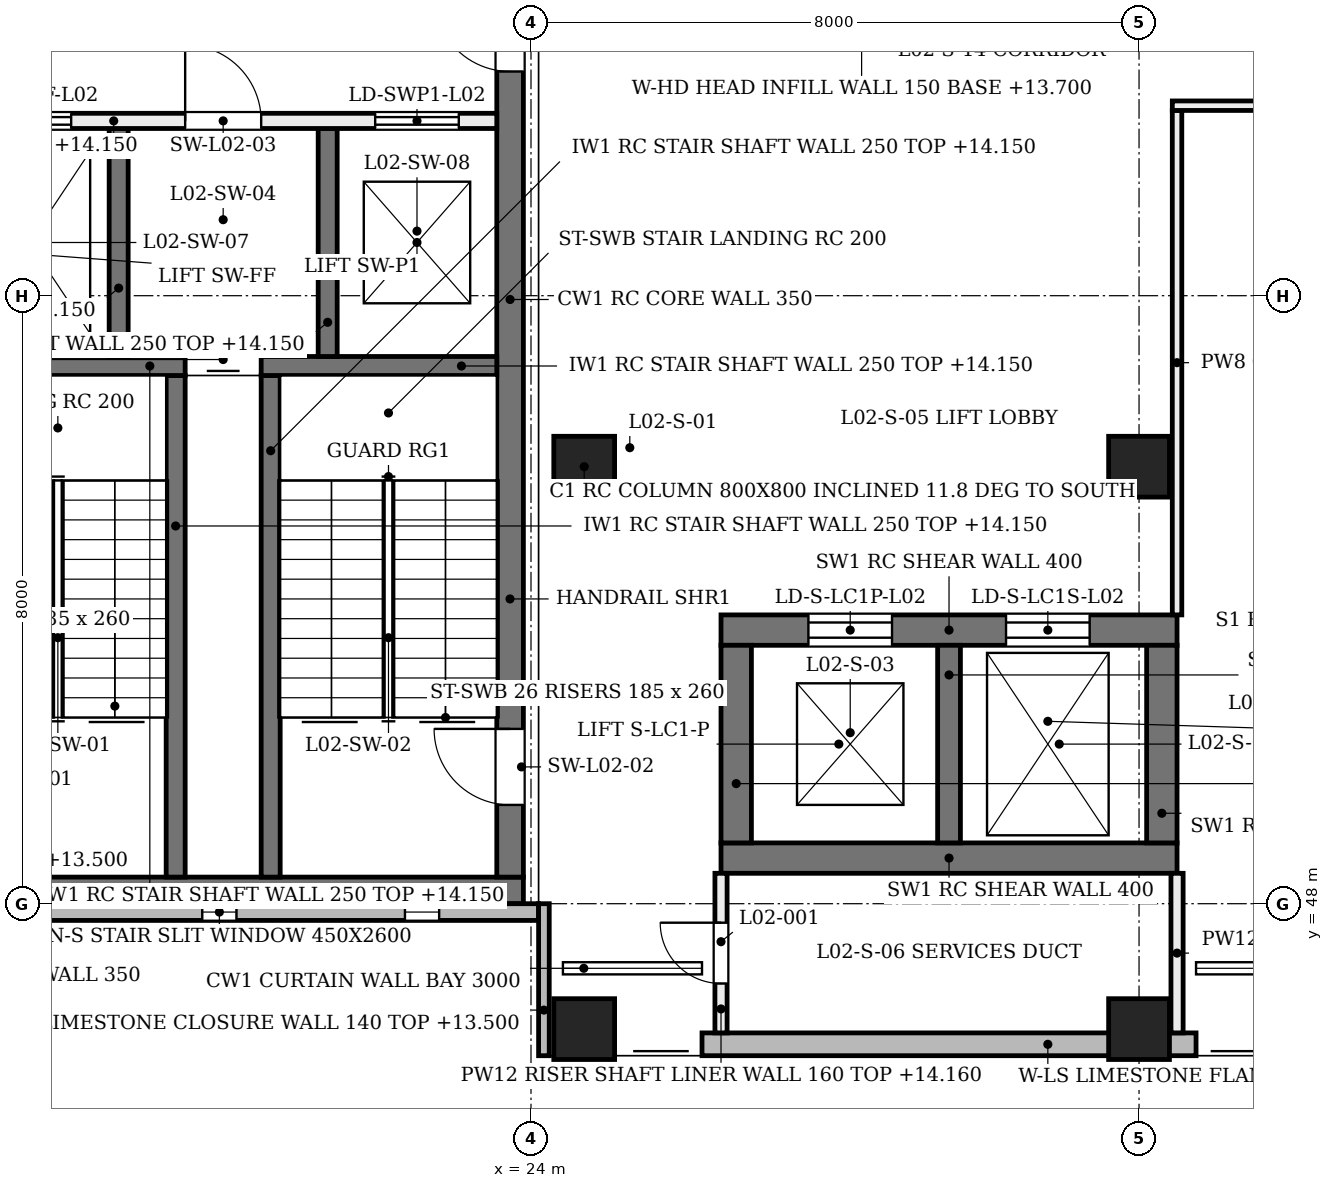
"""IFC4 building model, lengths in metres.
Left out: names, types, materials, properties, quantities, classifications, styles, units other than length and angle.
Written with IfcOpenShell. Run it as: python <this file> out.ifc"""

import sys

from ifc_helpers import new_model, si_unit, direction, frame, frame_2d, origin, origin_2d, place, context, subcontext, project, spatial, rectangle, extrude, element, fill, save


model = new_model("IFC4")
c1 = context("Model", 3, precision=1e-05, world=origin(), true_north=direction((0.0, 1.0)))
c2 = subcontext(c1, "Body", "Model", "MODEL_VIEW")
j1 = project(units=[si_unit("LENGTHUNIT", "METRE"), si_unit("PLANEANGLEUNIT", "RADIAN")], contexts=[c1])
p1 = place(None, origin())
s1 = spatial("IfcSite", under=j1, at=p1, CompositionType="ELEMENT")
p2 = place(p1, origin())
s2 = spatial("IfcBuilding", under=s1, at=p2, CompositionType="ELEMENT")
p3 = place(p2, frame((0.0, 0.0, 9.6)))
s3 = spatial("IfcBuildingStorey", under=s2, at=p3, CompositionType="ELEMENT", Elevation=9.6)
p4 = place(p3, frame((26.5, 48.6, 0.0), z_axis=(0.0, 0.0, 1.0), x_axis=(1.0, 0.0, 0.0)))
e1 = element("IfcWall", 1, at=p4, inside=s3, PredefinedType="SHEAR", context=c2, shape_type="SweptSolid", body=[
    extrude(rectangle(XDim=6.0, YDim=0.4, at=frame_2d((3.0, 0.0))), origin(), (0.0, 0.0, 1.0), 4.58),
])
p5 = place(p3, frame((26.5, 51.6, 0.0), z_axis=(0.0, 0.0, 1.0), x_axis=(1.0, 0.0, 0.0)))
e2 = element("IfcWall", 2, at=p5, inside=s3, PredefinedType="SHEAR", context=c2, shape_type="SweptSolid", body=[
    extrude(rectangle(XDim=6.0, YDim=0.4, at=frame_2d((3.0, 0.0))), origin(), (0.0, 0.0, 1.0), 4.58),
])
p6 = place(p5, frame((1.15, 0.0, 0.0)))
e3 = element("IfcOpeningElement", 3, at=p6, cuts=e2, PredefinedType="OPENING", context=c2, shape_type="SweptSolid", body=[
    extrude(rectangle(XDim=1.1, YDim=2.1, at=frame_2d((0.55, 1.05))), frame((0.0, 0.21, 0.0), z_axis=(0.0, -1.0, 0.0), x_axis=(1.0, 0.0, 0.0)), (0.0, 0.0, 1.0), 0.42),
])
p7 = place(p5, frame((3.75, 0.0, 0.0)))
e4 = element("IfcOpeningElement", 4, at=p7, cuts=e2, PredefinedType="OPENING", context=c2, shape_type="SweptSolid", body=[
    extrude(rectangle(XDim=1.1, YDim=2.1, at=frame_2d((0.55, 1.05))), frame((0.0, 0.21, 0.0), z_axis=(0.0, -1.0, 0.0), x_axis=(1.0, 0.0, 0.0)), (0.0, 0.0, 1.0), 0.42),
])
for number, where, z_axis, x_axis in (
    (5, (26.7, 48.8, 0.0), (0.0, 0.0, 1.0), (0.0, 1.0, 0.0)),
    (6, (32.3, 48.8, 0.0), (0.0, 0.0, 1.0), (0.0, 1.0, 0.0)),
):
    element("IfcWall", number, at=place(p3, frame(where, z_axis=z_axis, x_axis=x_axis)), inside=s3, PredefinedType="SHEAR", context=c2, shape_type="SweptSolid", body=[
        extrude(rectangle(XDim=2.6, YDim=0.4, at=frame_2d((1.3, 0.0))), origin(), (0.0, 0.0, 1.0), 4.58),
    ])
p8 = place(p3, frame((29.5, 48.8, 0.0), z_axis=(0.0, 0.0, 1.0), x_axis=(0.0, 1.0, 0.0)))
e7 = element("IfcWall", 7, at=p8, inside=s3, PredefinedType="SHEAR", context=c2, shape_type="SweptSolid", body=[
    extrude(rectangle(XDim=2.6, YDim=0.3, at=frame_2d((1.3, 0.0))), origin(), (0.0, 0.0, 1.0), 4.58),
])
p9 = place(p3, frame((16.0, 48.175, 0.0), z_axis=(0.0, 0.0, 1.0), x_axis=(1.0, 0.0, 0.0)))
e8 = element("IfcWall", 8, at=p9, inside=s3, PredefinedType="SHEAR", context=c2, shape_type="SweptSolid", body=[
    extrude(rectangle(XDim=7.9, YDim=0.35, at=frame_2d((3.95, 0.0))), origin(), (0.0, 0.0, 1.0), 4.58),
])
p10 = place(p3, frame((23.725, 48.35, 0.0), z_axis=(0.0, 0.0, 1.0), x_axis=(0.0, 1.0, 0.0)))
e9 = element("IfcWall", 9, at=p10, inside=s3, PredefinedType="SHEAR", context=c2, shape_type="SweptSolid", body=[
    extrude(rectangle(XDim=15.2, YDim=0.35, at=frame_2d((7.6, 0.0))), origin(), (0.0, 0.0, 1.0), 4.58),
])
p11 = place(p10, frame((0.95, 0.0, 0.0)))
e10 = element("IfcOpeningElement", 10, at=p11, cuts=e9, PredefinedType="OPENING", context=c2, shape_type="SweptSolid", body=[
    extrude(rectangle(XDim=1.0, YDim=2.1, at=frame_2d((0.5, 1.05))), frame((0.0, 0.185, 0.0), z_axis=(0.0, -1.0, 0.0), x_axis=(1.0, 0.0, 0.0)), (0.0, 0.0, 1.0), 0.37),
])
p12 = place(p10, frame((10.6, 0.0, 0.0)))
e11 = element("IfcOpeningElement", 11, at=p12, cuts=e9, PredefinedType="OPENING", context=c2, shape_type="SweptSolid", body=[
    extrude(rectangle(XDim=1.0, YDim=2.1, at=frame_2d((0.5, 1.05))), frame((0.0, 0.185, 0.0), z_axis=(0.0, -1.0, 0.0), x_axis=(1.0, 0.0, 0.0)), (0.0, 0.0, 1.0), 0.37),
])
for number, where, z_axis, x_axis in (
    (12, (24.7, 46.6, 0.0), (0.0, -0.204, 0.979), (1.0, 0.0, 0.0)),
    (13, (32.0, 46.6, 0.0), (0.0, -0.204, 0.979), (1.0, 0.0, 0.0)),
    (14, (24.7, 54.0, 0.0), (0.0, -0.204, 0.979), (1.0, 0.0, 0.0)),
    (15, (32.0, 54.0, 0.0), (0.0, -0.204, 0.979), (1.0, 0.0, 0.0)),
):
    element("IfcColumn", number, at=place(p3, frame(where, z_axis=z_axis, x_axis=x_axis)), inside=s3, PredefinedType="COLUMN", context=c2, shape_type="SweptSolid", body=[
        extrude(rectangle(XDim=0.8, YDim=0.8, at=origin_2d()), origin(), (0.0, 0.0, 1.0), 4.903),
    ])
p13 = place(p3, frame((26.25, 46.15, 0.0), z_axis=(0.0, 0.0, 1.0), x_axis=(1.0, 0.0, 0.0)))
e16 = element("IfcWall", 16, at=p13, inside=s3, PredefinedType="SOLIDWALL", context=c2, shape_type="SweptSolid", body=[
    extrude(rectangle(XDim=6.5, YDim=0.3, at=frame_2d((3.25, 0.0))), origin(), (0.0, 0.0, 1.0), 3.9),
])
p14 = place(p3, frame((15.9, 47.89, 0.0), z_axis=(0.0, 0.0, 1.0), x_axis=(1.0, 0.0, 0.0)))
e17 = element("IfcWall", 17, at=p14, inside=s3, PredefinedType="SOLIDWALL", context=c2, shape_type="SweptSolid", body=[
    extrude(rectangle(XDim=8.2, YDim=0.22, at=frame_2d((4.1, 0.0))), origin(), (0.0, 0.0, 1.0), 3.9),
])
p15 = place(p14, frame((1.108, 0.0, 0.9)))
e18 = element("IfcOpeningElement", 18, at=p15, cuts=e17, PredefinedType="OPENING", context=c2, shape_type="SweptSolid", body=[
    extrude(rectangle(XDim=0.45, YDim=2.6, at=frame_2d((0.225, 1.3))), frame((0.0, 0.12, 0.0), z_axis=(0.0, -1.0, 0.0), x_axis=(1.0, 0.0, 0.0)), (0.0, 0.0, 1.0), 0.24),
])
p16 = place(p14, frame((3.775, 0.0, 0.9)))
e19 = element("IfcOpeningElement", 19, at=p16, cuts=e17, PredefinedType="OPENING", context=c2, shape_type="SweptSolid", body=[
    extrude(rectangle(XDim=0.45, YDim=2.6, at=frame_2d((0.225, 1.3))), frame((0.0, 0.12, 0.0), z_axis=(0.0, -1.0, 0.0), x_axis=(1.0, 0.0, 0.0)), (0.0, 0.0, 1.0), 0.24),
])
p17 = place(p14, frame((6.442, 0.0, 0.9)))
e20 = element("IfcOpeningElement", 20, at=p17, cuts=e17, PredefinedType="OPENING", context=c2, shape_type="SweptSolid", body=[
    extrude(rectangle(XDim=0.45, YDim=2.6, at=frame_2d((0.225, 1.3))), frame((0.0, 0.12, 0.0), z_axis=(0.0, -1.0, 0.0), x_axis=(1.0, 0.0, 0.0)), (0.0, 0.0, 1.0), 0.24),
])
p18 = place(p3, frame((24.17, 46.0, 0.0), z_axis=(0.0, 0.0, 1.0), x_axis=(0.0, 1.0, 0.0)))
e21 = element("IfcWall", 21, at=p18, inside=s3, PredefinedType="SOLIDWALL", context=c2, shape_type="SweptSolid", body=[
    extrude(rectangle(XDim=2.0, YDim=0.14, at=frame_2d((1.0, 0.0))), origin(), (0.0, 0.0, 1.0), 3.9),
])
for number, where, z_axis, x_axis in (
    (22, (19.325, 48.35, 0.0), (0.0, 0.0, 1.0), (0.0, 1.0, 0.0)),
    (23, (20.575, 48.35, 0.0), (0.0, 0.0, 1.0), (0.0, 1.0, 0.0)),
):
    element("IfcWall", number, at=place(p3, frame(where, z_axis=z_axis, x_axis=x_axis)), inside=s3, PredefinedType="SOLIDWALL", context=c2, shape_type="SweptSolid", body=[
        extrude(rectangle(XDim=6.6, YDim=0.25, at=frame_2d((3.3, 0.0))), origin(), (0.0, 0.0, 1.0), 4.55),
    ])
p19 = place(p3, frame((16.35, 55.075, 0.0), z_axis=(0.0, 0.0, 1.0), x_axis=(1.0, 0.0, 0.0)))
e24 = element("IfcWall", 24, at=p19, inside=s3, PredefinedType="SOLIDWALL", context=c2, shape_type="SweptSolid", body=[
    extrude(rectangle(XDim=3.1, YDim=0.25, at=frame_2d((1.55, 0.0))), origin(), (0.0, 0.0, 1.0), 4.55),
])
p20 = place(p3, frame((20.45, 55.075, 0.0), z_axis=(0.0, 0.0, 1.0), x_axis=(1.0, 0.0, 0.0)))
e25 = element("IfcWall", 25, at=p20, inside=s3, PredefinedType="SOLIDWALL", context=c2, shape_type="SweptSolid", body=[
    extrude(rectangle(XDim=3.1, YDim=0.25, at=frame_2d((1.55, 0.0))), origin(), (0.0, 0.0, 1.0), 4.55),
])
for number, where, z_axis, x_axis in (
    (26, (18.575, 55.2, 0.0), (0.0, 0.0, 1.0), (0.0, 1.0, 0.0)),
    (27, (21.325, 55.2, 0.0), (0.0, 0.0, 1.0), (0.0, 1.0, 0.0)),
):
    element("IfcWall", number, at=place(p3, frame(where, z_axis=z_axis, x_axis=x_axis)), inside=s3, PredefinedType="SOLIDWALL", context=c2, shape_type="SweptSolid", body=[
        extrude(rectangle(XDim=3.0, YDim=0.25, at=frame_2d((1.5, 0.0))), origin(), (0.0, 0.0, 1.0), 4.55),
    ])
p21 = place(p3, frame((16.35, 58.3, 0.0), z_axis=(0.0, 0.0, 1.0), x_axis=(1.0, 0.0, 0.0)))
e28 = element("IfcWall", 28, at=p21, inside=s3, PredefinedType="SOLIDWALL", context=c2, shape_type="SweptSolid", body=[
    extrude(rectangle(XDim=7.2, YDim=0.2, at=frame_2d((3.6, 0.0))), origin(), (0.0, 0.0, 1.0), 4.55),
])
p22 = place(p21, frame((0.5, 0.0, 0.0)))
e29 = element("IfcOpeningElement", 29, at=p22, cuts=e28, PredefinedType="OPENING", context=c2, shape_type="SweptSolid", body=[
    extrude(rectangle(XDim=1.1, YDim=2.1, at=frame_2d((0.55, 1.05))), frame((0.0, 0.11, 0.0), z_axis=(0.0, -1.0, 0.0), x_axis=(1.0, 0.0, 0.0)), (0.0, 0.0, 1.0), 0.22),
])
p23 = place(p21, frame((5.6, 0.0, 0.0)))
e30 = element("IfcOpeningElement", 30, at=p23, cuts=e28, PredefinedType="OPENING", context=c2, shape_type="SweptSolid", body=[
    extrude(rectangle(XDim=1.1, YDim=2.1, at=frame_2d((0.55, 1.05))), frame((0.0, 0.11, 0.0), z_axis=(0.0, -1.0, 0.0), x_axis=(1.0, 0.0, 0.0)), (0.0, 0.0, 1.0), 0.22),
])
p24 = place(p21, frame((3.1, 0.0, 0.0)))
e31 = element("IfcOpeningElement", 31, at=p24, cuts=e28, PredefinedType="OPENING", context=c2, shape_type="SweptSolid", body=[
    extrude(rectangle(XDim=1.0, YDim=2.1, at=frame_2d((0.5, 1.05))), frame((0.0, 0.11, 0.0), z_axis=(0.0, -1.0, 0.0), x_axis=(1.0, 0.0, 0.0)), (0.0, 0.0, 1.0), 0.22),
])
p25 = place(p3, frame((26.5, 46.3, 0.0), z_axis=(0.0, 0.0, 1.0), x_axis=(0.0, 1.0, 0.0)))
e32 = element("IfcWall", 32, at=p25, inside=s3, PredefinedType="PARTITIONING", context=c2, shape_type="SweptSolid", body=[
    extrude(rectangle(XDim=2.1, YDim=0.16, at=frame_2d((1.05, 0.0))), origin(), (0.0, 0.0, 1.0), 4.56),
])
p26 = place(p25, frame((0.65, 0.0, 0.0)))
e33 = element("IfcOpeningElement", 33, at=p26, cuts=e32, PredefinedType="OPENING", context=c2, shape_type="SweptSolid", body=[
    extrude(rectangle(XDim=0.8, YDim=2.1, at=frame_2d((0.4, 1.05))), frame((0.0, 0.09, 0.0), z_axis=(0.0, -1.0, 0.0), x_axis=(1.0, 0.0, 0.0)), (0.0, 0.0, 1.0), 0.18),
])
p27 = place(p3, frame((32.5, 46.3, 0.0), z_axis=(0.0, 0.0, 1.0), x_axis=(0.0, 1.0, 0.0)))
e34 = element("IfcWall", 34, at=p27, inside=s3, PredefinedType="PARTITIONING", context=c2, shape_type="SweptSolid", body=[
    extrude(rectangle(XDim=2.1, YDim=0.16, at=frame_2d((1.05, 0.0))), origin(), (0.0, 0.0, 1.0), 4.56),
])
p28 = place(p3, frame((32.5, 51.8, 0.0), z_axis=(0.0, 0.0, 1.0), x_axis=(0.0, 1.0, 0.0)))
e35 = element("IfcWall", 35, at=p28, inside=s3, PredefinedType="PARTITIONING", context=c2, shape_type="SweptSolid", body=[
    extrude(rectangle(XDim=6.637, YDim=0.125, at=frame_2d((3.319, 0.0))), origin(), (0.0, 0.0, 1.0), 4.08),
])
p29 = place(p3, frame((32.438, 58.5, 0.0), z_axis=(0.0, 0.0, 1.0), x_axis=(1.0, 0.0, 0.0)))
e36 = element("IfcWall", 36, at=p29, inside=s3, PredefinedType="PARTITIONING", context=c2, shape_type="SweptSolid", body=[
    extrude(rectangle(XDim=39.125, YDim=0.125, at=frame_2d((19.562, 0.0))), origin(), (0.0, 0.0, 1.0), 3.38),
])
p30 = place(p29, frame((2.238, 0.0, 0.0)))
e37 = element("IfcOpeningElement", 37, at=p30, cuts=e36, PredefinedType="OPENING", context=c2, shape_type="SweptSolid", body=[
    extrude(rectangle(XDim=1.6, YDim=2.2, at=frame_2d((0.8, 1.1))), frame((0.0, 0.073, 0.0), z_axis=(0.0, -1.0, 0.0), x_axis=(1.0, 0.0, 0.0)), (0.0, 0.0, 1.0), 0.145),
])
p31 = place(p29, frame((18.762, 0.0, 0.0)))
e38 = element("IfcOpeningElement", 38, at=p31, cuts=e36, PredefinedType="OPENING", context=c2, shape_type="SweptSolid", body=[
    extrude(rectangle(XDim=1.6, YDim=2.2, at=frame_2d((0.8, 1.1))), frame((0.0, 0.073, 0.0), z_axis=(0.0, -1.0, 0.0), x_axis=(1.0, 0.0, 0.0)), (0.0, 0.0, 1.0), 0.145),
])
p32 = place(p29, frame((35.288, 0.0, 0.0)))
e39 = element("IfcOpeningElement", 39, at=p32, cuts=e36, PredefinedType="OPENING", context=c2, shape_type="SweptSolid", body=[
    extrude(rectangle(XDim=1.6, YDim=2.2, at=frame_2d((0.8, 1.1))), frame((0.0, 0.073, 0.0), z_axis=(0.0, -1.0, 0.0), x_axis=(1.0, 0.0, 0.0)), (0.0, 0.0, 1.0), 0.145),
])
p33 = place(p16, origin())
e40 = element("IfcWindow", 40, at=p33, inside=s3, PartitioningType="SINGLE_PANEL", PredefinedType="WINDOW", context=c2, shape_type="SweptSolid", body=[
    extrude(rectangle(XDim=0.45, YDim=2.6, at=frame_2d((0.225, 1.3))), frame((0.0, 0.03, 0.0), z_axis=(0.0, -1.0, 0.0), x_axis=(1.0, 0.0, 0.0)), (0.0, 0.0, 1.0), 0.06),
])
fill(e19, e40)
p34 = place(p17, origin())
e41 = element("IfcWindow", 41, at=p34, inside=s3, PartitioningType="SINGLE_PANEL", PredefinedType="WINDOW", context=c2, shape_type="SweptSolid", body=[
    extrude(rectangle(XDim=0.45, YDim=2.6, at=frame_2d((0.225, 1.3))), frame((0.0, 0.03, 0.0), z_axis=(0.0, -1.0, 0.0), x_axis=(1.0, 0.0, 0.0)), (0.0, 0.0, 1.0), 0.06),
])
fill(e20, e41)
p35 = place(p11, frame((1.0, 0.0, 0.0), z_axis=(0.0, 0.0, 1.0), x_axis=(-1.0, 0.0, 0.0)))
e42 = element("IfcDoor", 42, at=p35, inside=s3, OperationType="SINGLE_SWING_RIGHT", PredefinedType="DOOR", context=c2, shape_type="SweptSolid", body=[
    extrude(rectangle(XDim=1.0, YDim=2.1, at=frame_2d((0.5, 1.05))), frame((0.0, 0.025, 0.0), z_axis=(0.0, -1.0, 0.0), x_axis=(1.0, 0.0, 0.0)), (0.0, 0.0, 1.0), 0.05),
])
fill(e10, e42)
p36 = place(p22, origin())
e43 = element("IfcDoor", 43, at=p36, inside=s3, OperationType="DOUBLE_DOOR_SLIDING", PredefinedType="DOOR", context=c2, shape_type="SweptSolid", body=[
    extrude(rectangle(XDim=1.1, YDim=2.1, at=frame_2d((0.55, 1.05))), frame((0.0, 0.025, 0.0), z_axis=(0.0, -1.0, 0.0), x_axis=(1.0, 0.0, 0.0)), (0.0, 0.0, 1.0), 0.05),
])
fill(e29, e43)
p37 = place(p23, origin())
e44 = element("IfcDoor", 44, at=p37, inside=s3, OperationType="DOUBLE_DOOR_SLIDING", PredefinedType="DOOR", context=c2, shape_type="SweptSolid", body=[
    extrude(rectangle(XDim=1.1, YDim=2.1, at=frame_2d((0.55, 1.05))), frame((0.0, 0.025, 0.0), z_axis=(0.0, -1.0, 0.0), x_axis=(1.0, 0.0, 0.0)), (0.0, 0.0, 1.0), 0.05),
])
fill(e30, e44)
p38 = place(p24, origin())
e45 = element("IfcDoor", 45, at=p38, inside=s3, OperationType="SINGLE_SWING_LEFT", PredefinedType="DOOR", context=c2, shape_type="SweptSolid", body=[
    extrude(rectangle(XDim=1.0, YDim=2.1, at=frame_2d((0.5, 1.05))), frame((0.0, 0.025, 0.0), z_axis=(0.0, -1.0, 0.0), x_axis=(1.0, 0.0, 0.0)), (0.0, 0.0, 1.0), 0.05),
])
fill(e31, e45)
p39 = place(p12, frame((1.0, 0.0, 0.0), z_axis=(0.0, 0.0, 1.0), x_axis=(-1.0, 0.0, 0.0)))
e46 = element("IfcDoor", 46, at=p39, inside=s3, OperationType="SINGLE_SWING_RIGHT", PredefinedType="DOOR", context=c2, shape_type="SweptSolid", body=[
    extrude(rectangle(XDim=1.0, YDim=2.1, at=frame_2d((0.5, 1.05))), frame((0.0, 0.025, 0.0), z_axis=(0.0, -1.0, 0.0), x_axis=(1.0, 0.0, 0.0)), (0.0, 0.0, 1.0), 0.05),
])
fill(e11, e46)
p40 = place(p6, origin())
e47 = element("IfcDoor", 47, at=p40, inside=s3, OperationType="DOUBLE_DOOR_SLIDING", PredefinedType="DOOR", context=c2, shape_type="SweptSolid", body=[
    extrude(rectangle(XDim=1.1, YDim=2.1, at=frame_2d((0.55, 1.05))), frame((0.0, 0.025, 0.0), z_axis=(0.0, -1.0, 0.0), x_axis=(1.0, 0.0, 0.0)), (0.0, 0.0, 1.0), 0.05),
])
fill(e3, e47)
p41 = place(p7, origin())
e48 = element("IfcDoor", 48, at=p41, inside=s3, OperationType="DOUBLE_DOOR_SLIDING", PredefinedType="DOOR", context=c2, shape_type="SweptSolid", body=[
    extrude(rectangle(XDim=1.1, YDim=2.1, at=frame_2d((0.55, 1.05))), frame((0.0, 0.025, 0.0), z_axis=(0.0, -1.0, 0.0), x_axis=(1.0, 0.0, 0.0)), (0.0, 0.0, 1.0), 0.05),
])
fill(e4, e48)
p42 = place(p26, frame((0.8, 0.0, 0.0), z_axis=(0.0, 0.0, 1.0), x_axis=(-1.0, 0.0, 0.0)))
e49 = element("IfcDoor", 49, at=p42, inside=s3, OperationType="SINGLE_SWING_RIGHT", PredefinedType="DOOR", context=c2, shape_type="SweptSolid", body=[
    extrude(rectangle(XDim=0.8, YDim=2.1, at=frame_2d((0.4, 1.05))), frame((0.0, 0.025, 0.0), z_axis=(0.0, -1.0, 0.0), x_axis=(1.0, 0.0, 0.0)), (0.0, 0.0, 1.0), 0.05),
])
fill(e33, e49)
save(model, sys.argv[1])
